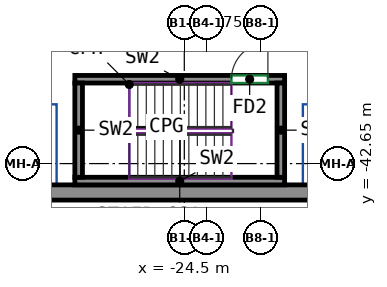
"""IFC4 building model, lengths in metres.
Left out: names, types, materials, properties, quantities, classifications, styles, units other than length and angle.
Written with IfcOpenShell. Run it as: python <this file> out.ifc"""

import sys

from ifc_helpers import new_model, si_unit, direction, frame, frame_2d, origin, place, context, subcontext, project, spatial, rectangle, extrude, source, transform, mapped, element, fill, save


model = new_model("IFC4")
c1 = context("Model", 3, precision=1e-05, world=origin(), true_north=direction((0.0, 1.0)))
c2 = subcontext(c1, "Body", "Model", "MODEL_VIEW")
j1 = project(units=[si_unit("LENGTHUNIT", "METRE"), si_unit("PLANEANGLEUNIT", "RADIAN")], contexts=[c1])
p1 = place(None, origin())
s1 = spatial("IfcSite", under=j1, at=p1, CompositionType="ELEMENT")
p2 = place(p1, origin())
s2 = spatial("IfcBuilding", under=s1, at=p2, CompositionType="ELEMENT")
p3 = place(p2, frame((0.0, 0.0, -9.0)))
s3 = spatial("IfcBuildingStorey", under=s2, at=p3, CompositionType="ELEMENT", Elevation=-9.0)
m1 = source(origin(), c2, "Body", "SweptSolid", [
    extrude(rectangle(XDim=113.0, YDim=0.5, at=frame_2d((56.5, 0.0))), origin(), (0.0, 0.0, 1.0), 4.9),
])
p4 = place(p3, frame((-57.15, -43.6, -0.4), z_axis=(0.0, 0.0, 1.0), x_axis=(1.0, 0.0, 0.0)))
e1 = element("IfcWall", 1, at=p4, inside=s3, PredefinedType="SOLIDWALL", context=c2, shape_type="MappedRepresentation", body=[
    mapped(m1, transform((0.0, 0.0, 0.0))),
])
m2 = source(origin(), c2, "Body", "SweptSolid", [
    extrude(rectangle(XDim=6.9, YDim=0.25, at=frame_2d((3.45, 0.0))), origin(), (0.0, 0.0, 1.0), 4.1),
])
p5 = place(p3, frame((-28.1, -43.225, 0.0), z_axis=(0.0, 0.0, 1.0), x_axis=(1.0, 0.0, 0.0)))
e2 = element("IfcWall", 2, at=p5, inside=s3, PredefinedType="SHEAR", context=c2, shape_type="MappedRepresentation", body=[
    mapped(m2, transform((0.0, 0.0, 0.0))),
])
p6 = place(p3, frame((-28.1, -39.875, 0.0), z_axis=(0.0, 0.0, 1.0), x_axis=(1.0, 0.0, 0.0)))
e3 = element("IfcWall", 3, at=p6, inside=s3, PredefinedType="SHEAR", context=c2, shape_type="MappedRepresentation", body=[
    mapped(m2, transform((0.0, 0.0, 0.0))),
])
p7 = place(p6, frame((5.15, 0.0, 0.0)))
e4 = element("IfcOpeningElement", 4, at=p7, cuts=e3, PredefinedType="OPENING", context=c2, shape_type="SweptSolid", body=[
    extrude(rectangle(XDim=1.2, YDim=2.1, at=frame_2d((0.6, 1.05))), frame((0.0, 0.135, 0.0), z_axis=(0.0, -1.0, 0.0), x_axis=(1.0, 0.0, 0.0)), (0.0, 0.0, 1.0), 0.27),
])
m3 = source(origin(), c2, "Body", "SweptSolid", [
    extrude(rectangle(XDim=3.1, YDim=0.25, at=frame_2d((1.55, 0.0))), origin(), (0.0, 0.0, 1.0), 4.1),
])
for number, where, z_axis, x_axis in (
    (5, (-27.975, -43.1, 0.0), (0.0, 0.0, 1.0), (0.0, 1.0, 0.0)),
    (6, (-21.325, -43.1, 0.0), (0.0, 0.0, 1.0), (0.0, 1.0, 0.0)),
):
    element("IfcWall", number, at=place(p3, frame(where, z_axis=z_axis, x_axis=x_axis)), inside=s3, PredefinedType="SHEAR", context=c2, shape_type="MappedRepresentation", body=[
        mapped(m3, transform((0.0, 0.0, 0.0))),
    ])
p8 = place(p7, origin())
e7 = element("IfcDoor", 7, at=p8, inside=s3, OperationType="SINGLE_SWING_RIGHT", PredefinedType="DOOR", context=c2, shape_type="SweptSolid", body=[
    extrude(rectangle(XDim=1.2, YDim=2.1, at=frame_2d((0.6, 1.05))), frame((0.0, 0.025, 0.0), z_axis=(0.0, -1.0, 0.0), x_axis=(1.0, 0.0, 0.0)), (0.0, 0.0, 1.0), 0.05),
])
fill(e4, e7)
save(model, sys.argv[1])
